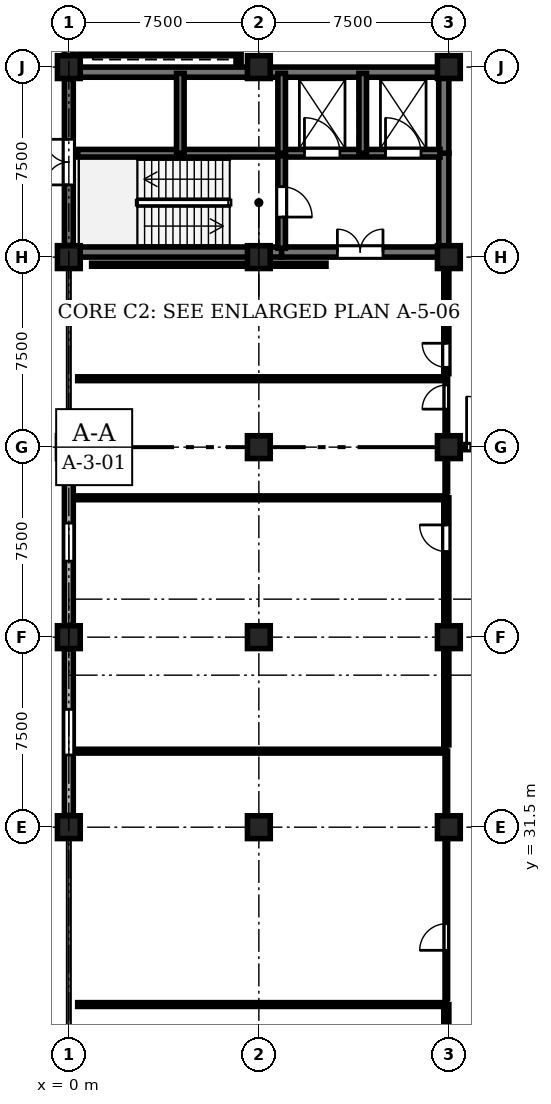
"""IFC4 building model, lengths in metres.
Left out: names, types, materials, properties, quantities, classifications, styles, units other than length and angle.
Written with IfcOpenShell. Run it as: python <this file> out.ifc"""

import sys

from ifc_helpers import new_model, si_unit, direction, frame, frame_2d, origin, origin_2d, place, context, subcontext, project, spatial, rectangle, circle, extrude, element, fill, save


model = new_model("IFC4")
c1 = context("Model", 3, precision=1e-05, world=origin(), true_north=direction((0.0, 1.0)))
c2 = subcontext(c1, "Body", "Model", "MODEL_VIEW")
j1 = project(units=[si_unit("LENGTHUNIT", "METRE"), si_unit("PLANEANGLEUNIT", "RADIAN")], contexts=[c1])
p1 = place(None, origin())
s1 = spatial("IfcSite", under=j1, at=p1, CompositionType="ELEMENT")
p2 = place(p1, origin())
s2 = spatial("IfcBuilding", under=s1, at=p2, CompositionType="ELEMENT")
p3 = place(p2, origin())
s3 = spatial("IfcBuildingStorey", under=s2, at=p3, CompositionType="ELEMENT", Elevation=0.0)
for number, where, z_axis, x_axis in (
    (1, (0.0, 31.5, 0.0), (0.0, 0.0, 1.0), (1.0, 0.0, 0.0)),
    (2, (0.0, 39.0, 0.0), (0.0, 0.0, 1.0), (1.0, 0.0, 0.0)),
):
    element("IfcColumn", number, at=place(p3, frame(where, z_axis=z_axis, x_axis=x_axis)), inside=s3, PredefinedType="COLUMN", context=c2, shape_type="SweptSolid", body=[
        extrude(rectangle(XDim=0.9, YDim=0.9, at=origin_2d()), origin(), (0.0, 0.0, 1.0), 4.8),
    ])
p4 = place(p3, frame((0.0, 46.5, 0.0), z_axis=(0.0, 0.0, 1.0), x_axis=(1.0, 0.0, 0.0)))
e3 = element("IfcColumn", 3, at=p4, inside=s3, PredefinedType="COLUMN", context=c2, shape_type="SweptSolid", body=[
    extrude(circle(Radius=0.45, at=origin_2d()), origin(), (0.0, 0.0, 1.0), 4.8),
])
for number, where, z_axis, x_axis in (
    (4, (0.0, 54.0, 0.0), (0.0, 0.0, 1.0), (1.0, 0.0, 0.0)),
    (5, (0.0, 61.5, 0.0), (0.0, 0.0, 1.0), (1.0, 0.0, 0.0)),
    (6, (7.5, 31.5, 0.0), (0.0, 0.0, 1.0), (1.0, 0.0, 0.0)),
):
    element("IfcColumn", number, at=place(p3, frame(where, z_axis=z_axis, x_axis=x_axis)), inside=s3, PredefinedType="COLUMN", context=c2, shape_type="SweptSolid", body=[
        extrude(rectangle(XDim=0.9, YDim=0.9, at=origin_2d()), origin(), (0.0, 0.0, 1.0), 4.8),
    ])
p5 = place(p3, frame((7.5, 39.0, 0.0), z_axis=(0.0, 0.0, 1.0), x_axis=(1.0, 0.0, 0.0)))
e7 = element("IfcColumn", 7, at=p5, inside=s3, PredefinedType="COLUMN", context=c2, shape_type="SweptSolid", body=[
    extrude(circle(Radius=0.45, at=origin_2d()), origin(), (0.0, 0.0, 1.0), 4.8),
])
for number, where, z_axis, x_axis in (
    (8, (7.5, 46.5, 0.0), (0.0, 0.0, 1.0), (1.0, 0.0, 0.0)),
    (9, (7.5, 54.0, 0.0), (0.0, 0.0, 1.0), (1.0, 0.0, 0.0)),
):
    element("IfcColumn", number, at=place(p3, frame(where, z_axis=z_axis, x_axis=x_axis)), inside=s3, PredefinedType="COLUMN", context=c2, shape_type="SweptSolid", body=[
        extrude(rectangle(XDim=0.9, YDim=0.9, at=origin_2d()), origin(), (0.0, 0.0, 1.0), 4.8),
    ])
for number, where, z_axis, x_axis in (
    (10, (7.5, 61.5, 0.0), (0.0, 0.0, 1.0), (1.0, 0.0, 0.0)),
    (11, (15.0, 31.5, 0.0), (0.0, 0.0, 1.0), (1.0, 0.0, 0.0)),
):
    element("IfcColumn", number, at=place(p3, frame(where, z_axis=z_axis, x_axis=x_axis)), inside=s3, PredefinedType="COLUMN", context=c2, shape_type="SweptSolid", body=[
        extrude(circle(Radius=0.45, at=origin_2d()), origin(), (0.0, 0.0, 1.0), 4.8),
    ])
for number, where, z_axis, x_axis in (
    (12, (15.0, 39.0, 0.0), (0.0, 0.0, 1.0), (1.0, 0.0, 0.0)),
    (13, (15.0, 46.5, 0.0), (0.0, 0.0, 1.0), (1.0, 0.0, 0.0)),
):
    element("IfcColumn", number, at=place(p3, frame(where, z_axis=z_axis, x_axis=x_axis)), inside=s3, PredefinedType="COLUMN", context=c2, shape_type="SweptSolid", body=[
        extrude(rectangle(XDim=0.9, YDim=0.9, at=origin_2d()), origin(), (0.0, 0.0, 1.0), 4.8),
    ])
p6 = place(p3, frame((15.0, 54.0, 0.0), z_axis=(0.0, 0.0, 1.0), x_axis=(1.0, 0.0, 0.0)))
e14 = element("IfcColumn", 14, at=p6, inside=s3, PredefinedType="COLUMN", context=c2, shape_type="SweptSolid", body=[
    extrude(circle(Radius=0.45, at=origin_2d()), origin(), (0.0, 0.0, 1.0), 4.8),
])
p7 = place(p3, frame((15.0, 61.5, 0.0), z_axis=(0.0, 0.0, 1.0), x_axis=(1.0, 0.0, 0.0)))
e15 = element("IfcColumn", 15, at=p7, inside=s3, PredefinedType="COLUMN", context=c2, shape_type="SweptSolid", body=[
    extrude(rectangle(XDim=0.9, YDim=0.9, at=origin_2d()), origin(), (0.0, 0.0, 1.0), 4.8),
])
p8 = place(p3, frame((0.0, 31.96, 0.0), z_axis=(0.0, 0.0, 1.0), x_axis=(0.0, 1.0, 0.0)))
e16 = element("IfcWall", 16, at=p8, inside=s3, PredefinedType="STANDARD", context=c2, shape_type="SweptSolid", body=[
    extrude(rectangle(XDim=6.58, YDim=0.35, at=frame_2d((3.29, 0.0))), origin(), (0.0, 0.0, 1.0), 3.9),
])
p9 = place(p8, frame((2.39, 0.0, 0.9)))
e17 = element("IfcOpeningElement", 17, at=p9, cuts=e16, PredefinedType="OPENING", context=c2, shape_type="SweptSolid", body=[
    extrude(rectangle(XDim=1.8, YDim=2.1, at=frame_2d((0.9, 1.05))), frame((0.0, 0.185, 0.0), z_axis=(0.0, -1.0, 0.0), x_axis=(1.0, 0.0, 0.0)), (0.0, 0.0, 1.0), 0.37),
])
p10 = place(p3, frame((0.0, 39.46, 0.0), z_axis=(0.0, 0.0, 1.0), x_axis=(0.0, 1.0, 0.0)))
e18 = element("IfcWall", 18, at=p10, inside=s3, PredefinedType="STANDARD", context=c2, shape_type="SweptSolid", body=[
    extrude(rectangle(XDim=6.58, YDim=0.35, at=frame_2d((3.29, 0.0))), origin(), (0.0, 0.0, 1.0), 3.9),
])
p11 = place(p10, frame((2.54, 0.0, 0.9)))
e19 = element("IfcOpeningElement", 19, at=p11, cuts=e18, PredefinedType="OPENING", context=c2, shape_type="SweptSolid", body=[
    extrude(rectangle(XDim=1.5, YDim=2.1, at=frame_2d((0.75, 1.05))), frame((0.0, 0.185, 0.0), z_axis=(0.0, -1.0, 0.0), x_axis=(1.0, 0.0, 0.0)), (0.0, 0.0, 1.0), 0.37),
])
p12 = place(p3, frame((0.0, 54.46, 0.0), z_axis=(0.0, 0.0, 1.0), x_axis=(0.0, 1.0, 0.0)))
e20 = element("IfcWall", 20, at=p12, inside=s3, PredefinedType="SHEAR", context=c2, shape_type="SweptSolid", body=[
    extrude(rectangle(XDim=6.58, YDim=0.35, at=frame_2d((3.29, 0.0))), origin(), (0.0, 0.0, 1.0), 4.5),
])
p13 = place(p12, frame((2.39, 0.0, 0.0)))
e21 = element("IfcOpeningElement", 21, at=p13, cuts=e20, PredefinedType="OPENING", context=c2, shape_type="SweptSolid", body=[
    extrude(rectangle(XDim=1.8, YDim=2.5, at=frame_2d((0.9, 1.25))), frame((0.0, 0.185, 0.0), z_axis=(0.0, -1.0, 0.0), x_axis=(1.0, 0.0, 0.0)), (0.0, 0.0, 1.0), 0.37),
])
p14 = place(p3, frame((0.0, 61.96, 0.0), z_axis=(0.0, 0.0, 1.0), x_axis=(0.0, 1.0, 0.0)))
e22 = element("IfcWall", 22, at=p14, inside=s3, PredefinedType="STANDARD", context=c2, shape_type="SweptSolid", body=[
    extrude(rectangle(XDim=6.58, YDim=0.35, at=frame_2d((3.29, 0.0))), origin(), (0.0, 0.0, 1.0), 3.9),
])
p15 = place(p14, frame((2.09, 0.0, 0.9)))
e23 = element("IfcOpeningElement", 23, at=p15, cuts=e22, PredefinedType="OPENING", context=c2, shape_type="SweptSolid", body=[
    extrude(rectangle(XDim=2.4, YDim=2.1, at=frame_2d((1.2, 1.05))), frame((0.0, 0.185, 0.0), z_axis=(0.0, -1.0, 0.0), x_axis=(1.0, 0.0, 0.0)), (0.0, 0.0, 1.0), 0.37),
])
p16 = place(p3, frame((0.35, 54.2, 0.0), z_axis=(0.0, 0.0, 1.0), x_axis=(1.0, 0.0, 0.0)))
e24 = element("IfcWall", 24, at=p16, inside=s3, PredefinedType="SHEAR", context=c2, shape_type="SweptSolid", body=[
    extrude(rectangle(XDim=8.05, YDim=0.4, at=frame_2d((4.025, 0.0))), origin(), (0.0, 0.0, 1.0), 4.5),
])
p17 = place(p3, frame((8.4, 54.2, 0.0), z_axis=(0.0, 0.0, 1.0), x_axis=(1.0, 0.0, 0.0)))
e25 = element("IfcWall", 25, at=p17, inside=s3, PredefinedType="SHEAR", context=c2, shape_type="SweptSolid", body=[
    extrude(rectangle(XDim=6.25, YDim=0.4, at=frame_2d((3.125, 0.0))), origin(), (0.0, 0.0, 1.0), 4.5),
])
p18 = place(p17, frame((2.2, 0.0, 0.0)))
e26 = element("IfcOpeningElement", 26, at=p18, cuts=e25, PredefinedType="OPENING", context=c2, shape_type="SweptSolid", body=[
    extrude(rectangle(XDim=1.8, YDim=2.25, at=frame_2d((0.9, 1.125))), frame((0.0, 0.21, 0.0), z_axis=(0.0, -1.0, 0.0), x_axis=(1.0, 0.0, 0.0)), (0.0, 0.0, 1.0), 0.42),
])
p19 = place(p3, frame((0.35, 61.3, 0.0), z_axis=(0.0, 0.0, 1.0), x_axis=(1.0, 0.0, 0.0)))
e27 = element("IfcWall", 27, at=p19, inside=s3, PredefinedType="SHEAR", context=c2, shape_type="SweptSolid", body=[
    extrude(rectangle(XDim=14.3, YDim=0.4, at=frame_2d((7.15, 0.0))), origin(), (0.0, 0.0, 1.0), 4.5),
])
p20 = place(p3, frame((14.8, 54.35, 0.0), z_axis=(0.0, 0.0, 1.0), x_axis=(0.0, 1.0, 0.0)))
e28 = element("IfcWall", 28, at=p20, inside=s3, PredefinedType="SHEAR", context=c2, shape_type="SweptSolid", body=[
    extrude(rectangle(XDim=3.75, YDim=0.4, at=frame_2d((1.875, 0.0))), origin(), (0.0, 0.0, 1.0), 4.5),
])
p21 = place(p3, frame((14.8, 58.1, 0.0), z_axis=(0.0, 0.0, 1.0), x_axis=(0.0, 1.0, 0.0)))
e29 = element("IfcWall", 29, at=p21, inside=s3, PredefinedType="SHEAR", context=c2, shape_type="SweptSolid", body=[
    extrude(rectangle(XDim=3.05, YDim=0.4, at=frame_2d((1.525, 0.0))), origin(), (0.0, 0.0, 1.0), 4.5),
])
p22 = place(p3, frame((0.35, 58.1, 0.0), z_axis=(0.0, 0.0, 1.0), x_axis=(1.0, 0.0, 0.0)))
e30 = element("IfcWall", 30, at=p22, inside=s3, PredefinedType="SHEAR", context=c2, shape_type="SweptSolid", body=[
    extrude(rectangle(XDim=8.05, YDim=0.3, at=frame_2d((4.025, 0.0))), origin(), (0.0, 0.0, 1.0), 4.5),
])
p23 = place(p3, frame((8.4, 58.1, 0.0), z_axis=(0.0, 0.0, 1.0), x_axis=(1.0, 0.0, 0.0)))
e31 = element("IfcWall", 31, at=p23, inside=s3, PredefinedType="SHEAR", context=c2, shape_type="SweptSolid", body=[
    extrude(rectangle(XDim=6.25, YDim=0.3, at=frame_2d((3.125, 0.0))), origin(), (0.0, 0.0, 1.0), 4.5),
])
p24 = place(p23, frame((0.9, 0.0, 0.0)))
e32 = element("IfcOpeningElement", 32, at=p24, cuts=e31, PredefinedType="OPENING", context=c2, shape_type="SweptSolid", body=[
    extrude(rectangle(XDim=1.4, YDim=2.25, at=frame_2d((0.7, 1.125))), frame((0.0, 0.16, 0.0), z_axis=(0.0, -1.0, 0.0), x_axis=(1.0, 0.0, 0.0)), (0.0, 0.0, 1.0), 0.32),
])
p25 = place(p23, frame((4.1, 0.0, 0.0)))
e33 = element("IfcOpeningElement", 33, at=p25, cuts=e31, PredefinedType="OPENING", context=c2, shape_type="SweptSolid", body=[
    extrude(rectangle(XDim=1.4, YDim=2.25, at=frame_2d((0.7, 1.125))), frame((0.0, 0.16, 0.0), z_axis=(0.0, -1.0, 0.0), x_axis=(1.0, 0.0, 0.0)), (0.0, 0.0, 1.0), 0.32),
])
p26 = place(p3, frame((8.4, 58.0, 0.0), z_axis=(0.0, 0.0, 1.0), x_axis=(0.0, -1.0, 0.0)))
e34 = element("IfcWall", 34, at=p26, inside=s3, PredefinedType="SHEAR", context=c2, shape_type="SweptSolid", body=[
    extrude(rectangle(XDim=3.65, YDim=0.3, at=frame_2d((1.825, 0.0))), origin(), (0.0, 0.0, 1.0), 4.5),
])
p27 = place(p26, frame((1.22, 0.0, 0.0)))
e35 = element("IfcOpeningElement", 35, at=p27, cuts=e34, PredefinedType="OPENING", context=c2, shape_type="SweptSolid", body=[
    extrude(rectangle(XDim=1.2, YDim=2.25, at=frame_2d((0.6, 1.125))), frame((0.0, 0.16, 0.0), z_axis=(0.0, -1.0, 0.0), x_axis=(1.0, 0.0, 0.0)), (0.0, 0.0, 1.0), 0.32),
])
for number, where, z_axis, x_axis in (
    (36, (4.4, 58.1, 0.0), (0.0, 0.0, 1.0), (0.0, 1.0, 0.0)),
    (37, (8.4, 58.1, 0.0), (0.0, 0.0, 1.0), (0.0, 1.0, 0.0)),
    (38, (11.6, 58.1, 0.0), (0.0, 0.0, 1.0), (0.0, 1.0, 0.0)),
):
    element("IfcWall", number, at=place(p3, frame(where, z_axis=z_axis, x_axis=x_axis)), inside=s3, PredefinedType="SHEAR", context=c2, shape_type="SweptSolid", body=[
        extrude(rectangle(XDim=3.15, YDim=0.3, at=frame_2d((1.575, 0.0))), origin(), (0.0, 0.0, 1.0), 4.5),
    ])
p28 = place(p3, frame((6.7, 61.65, 0.0), z_axis=(0.0, 0.0, 1.0), x_axis=(0.0, 1.0, 0.0)))
e39 = element("IfcWall", 39, at=p28, inside=s3, PredefinedType="STANDARD", context=c2, shape_type="SweptSolid", body=[
    extrude(rectangle(XDim=31.0, YDim=0.2, at=frame_2d((15.5, 0.0))), origin(), (0.0, 0.0, 1.0), 4.44),
])
p29 = place(p3, frame((0.4, 62.05, 0.0), z_axis=(0.0, 0.0, 1.0), x_axis=(1.0, 0.0, 0.0)))
e40 = element("IfcWall", 40, at=p29, inside=s3, PredefinedType="STANDARD", context=c2, shape_type="SweptSolid", body=[
    extrude(rectangle(XDim=6.3, YDim=0.2, at=frame_2d((3.15, 0.0))), origin(), (0.0, 0.0, 1.0), 4.44),
])
p30 = place(p3, frame((14.9, 15.3, 0.0), z_axis=(0.0, 0.0, 1.0), x_axis=(0.0, 1.0, 0.0)))
e41 = element("IfcWall", 41, at=p30, inside=s3, PredefinedType="STANDARD", context=c2, shape_type="SweptSolid", body=[
    extrude(rectangle(XDim=9.2, YDim=0.2, at=frame_2d((4.6, 0.0))), origin(), (0.0, 0.0, 1.0), 3.785),
])
p31 = place(p30, frame((2.545, 0.0, 0.0)))
e42 = element("IfcOpeningElement", 42, at=p31, cuts=e41, PredefinedType="OPENING", context=c2, shape_type="SweptSolid", body=[
    extrude(rectangle(XDim=1.05, YDim=2.2, at=frame_2d((0.525, 1.1))), frame((0.0, 0.11, 0.0), z_axis=(0.0, -1.0, 0.0), x_axis=(1.0, 0.0, 0.0)), (0.0, 0.0, 1.0), 0.22),
])
p32 = place(p3, frame((14.9, 24.75, 0.0), z_axis=(0.0, 0.0, 1.0), x_axis=(0.0, 1.0, 0.0)))
e43 = element("IfcWall", 43, at=p32, inside=s3, PredefinedType="PARTITIONING", context=c2, shape_type="SweptSolid", body=[
    extrude(rectangle(XDim=9.75, YDim=0.1, at=frame_2d((4.875, 0.0))), origin(), (0.0, 0.0, 1.0), 3.785),
])
p33 = place(p32, frame((1.89, 0.0, 0.0)))
e44 = element("IfcOpeningElement", 44, at=p33, cuts=e43, PredefinedType="OPENING", context=c2, shape_type="SweptSolid", body=[
    extrude(rectangle(XDim=1.05, YDim=2.2, at=frame_2d((0.525, 1.1))), frame((0.0, 0.06, 0.0), z_axis=(0.0, -1.0, 0.0), x_axis=(1.0, 0.0, 0.0)), (0.0, 0.0, 1.0), 0.12),
])
p34 = place(p3, frame((14.9, 34.75, 0.0), z_axis=(0.0, 0.0, 1.0), x_axis=(0.0, 1.0, 0.0)))
e45 = element("IfcWall", 45, at=p34, inside=s3, PredefinedType="STANDARD", context=c2, shape_type="SweptSolid", body=[
    extrude(rectangle(XDim=9.75, YDim=0.2, at=frame_2d((4.875, 0.0))), origin(), (0.0, 0.0, 1.0), 3.935),
])
p35 = place(p34, frame((7.63, 0.0, 0.0)))
e46 = element("IfcOpeningElement", 46, at=p35, cuts=e45, PredefinedType="OPENING", context=c2, shape_type="SweptSolid", body=[
    extrude(rectangle(XDim=1.05, YDim=2.2, at=frame_2d((0.525, 1.1))), frame((0.0, 0.11, 0.0), z_axis=(0.0, -1.0, 0.0), x_axis=(1.0, 0.0, 0.0)), (0.0, 0.0, 1.0), 0.22),
])
p36 = place(p3, frame((14.9, 44.75, 0.0), z_axis=(0.0, 0.0, 1.0), x_axis=(0.0, 1.0, 0.0)))
e47 = element("IfcWall", 47, at=p36, inside=s3, PredefinedType="PARTITIONING", context=c2, shape_type="SweptSolid", body=[
    extrude(rectangle(XDim=4.45, YDim=0.1, at=frame_2d((2.225, 0.0))), origin(), (0.0, 0.0, 1.0), 3.935),
])
p37 = place(p36, frame((3.25, 0.0, 0.0)))
e48 = element("IfcOpeningElement", 48, at=p37, cuts=e47, PredefinedType="OPENING", context=c2, shape_type="SweptSolid", body=[
    extrude(rectangle(XDim=0.95, YDim=2.15, at=frame_2d((0.475, 1.075))), frame((0.0, 0.06, 0.0), z_axis=(0.0, -1.0, 0.0), x_axis=(1.0, 0.0, 0.0)), (0.0, 0.0, 1.0), 0.12),
])
p38 = place(p3, frame((14.9, 49.4, 0.0), z_axis=(0.0, 0.0, 1.0), x_axis=(0.0, 1.0, 0.0)))
e49 = element("IfcWall", 49, at=p38, inside=s3, PredefinedType="STANDARD", context=c2, shape_type="SweptSolid", body=[
    extrude(rectangle(XDim=4.3, YDim=0.2, at=frame_2d((2.15, 0.0))), origin(), (0.0, 0.0, 1.0), 3.935),
])
p39 = place(p38, frame((0.25, 0.0, 0.0)))
e50 = element("IfcOpeningElement", 50, at=p39, cuts=e49, PredefinedType="OPENING", context=c2, shape_type="SweptSolid", body=[
    extrude(rectangle(XDim=0.95, YDim=2.15, at=frame_2d((0.475, 1.075))), frame((0.0, 0.11, 0.0), z_axis=(0.0, -1.0, 0.0), x_axis=(1.0, 0.0, 0.0)), (0.0, 0.0, 1.0), 0.22),
])
for number, where, z_axis, x_axis in (
    (51, (0.35, 24.5, 0.0), (0.0, 0.0, 1.0), (1.0, 0.0, 0.0)),
    (52, (0.35, 34.5, 0.0), (0.0, 0.0, 1.0), (1.0, 0.0, 0.0)),
    (53, (0.35, 44.5, 0.0), (0.0, 0.0, 1.0), (1.0, 0.0, 0.0)),
    (54, (0.35, 49.2, 0.0), (0.0, 0.0, 1.0), (1.0, 0.0, 0.0)),
):
    element("IfcWall", number, at=place(p3, frame(where, z_axis=z_axis, x_axis=x_axis)), inside=s3, PredefinedType="PARTITIONING", context=c2, shape_type="SweptSolid", body=[
        extrude(rectangle(XDim=14.55, YDim=0.15, at=frame_2d((7.275, 0.0))), origin(), (0.0, 0.0, 1.0), 4.485),
    ])
p40 = place(p3, frame((0.9, 53.7, 0.0), z_axis=(0.0, 0.0, 1.0), x_axis=(1.0, 0.0, 0.0)))
e55 = element("IfcWall", 55, at=p40, inside=s3, PredefinedType="PARTITIONING", context=c2, shape_type="SweptSolid", body=[
    extrude(rectangle(XDim=9.25, YDim=0.12, at=frame_2d((4.625, 0.0))), origin(), (0.0, 0.0, 1.0), 3.835),
])
p41 = place(p3, frame((15.2, 46.5, 0.0), z_axis=(0.0, 0.0, 1.0), x_axis=(1.0, 0.0, 0.0)))
e56 = element("IfcWall", 56, at=p41, inside=s3, PredefinedType="STANDARD", context=c2, shape_type="SweptSolid", body=[
    extrude(rectangle(XDim=3.0, YDim=0.2, at=frame_2d((1.5, 0.0))), origin(), (0.0, 0.0, 1.0), 3.835),
])
p42 = place(p41, frame((0.5, 0.0, 0.0)))
e57 = element("IfcOpeningElement", 57, at=p42, cuts=e56, PredefinedType="OPENING", context=c2, shape_type="SweptSolid", body=[
    extrude(rectangle(XDim=2.0, YDim=2.3, at=frame_2d((1.0, 1.15))), frame((0.0, 0.11, 0.0), z_axis=(0.0, -1.0, 0.0), x_axis=(1.0, 0.0, 0.0)), (0.0, 0.0, 1.0), 0.22),
])
p43 = place(p9, origin())
e58 = element("IfcWindow", 58, at=p43, inside=s3, PartitioningType="SINGLE_PANEL", PredefinedType="WINDOW", context=c2, shape_type="SweptSolid", body=[
    extrude(rectangle(XDim=1.8, YDim=2.1, at=frame_2d((0.9, 1.05))), frame((0.0, 0.03, 0.0), z_axis=(0.0, -1.0, 0.0), x_axis=(1.0, 0.0, 0.0)), (0.0, 0.0, 1.0), 0.06),
])
fill(e17, e58)
p44 = place(p11, origin())
e59 = element("IfcWindow", 59, at=p44, inside=s3, PartitioningType="SINGLE_PANEL", PredefinedType="WINDOW", context=c2, shape_type="SweptSolid", body=[
    extrude(rectangle(XDim=1.5, YDim=2.1, at=frame_2d((0.75, 1.05))), frame((0.0, 0.03, 0.0), z_axis=(0.0, -1.0, 0.0), x_axis=(1.0, 0.0, 0.0)), (0.0, 0.0, 1.0), 0.06),
])
fill(e19, e59)
p45 = place(p13, origin())
e60 = element("IfcDoor", 60, at=p45, inside=s3, OperationType="DOUBLE_DOOR_SINGLE_SWING", PredefinedType="DOOR", context=c2, shape_type="SweptSolid", body=[
    extrude(rectangle(XDim=1.8, YDim=2.5, at=frame_2d((0.9, 1.25))), frame((0.0, 0.025, 0.0), z_axis=(0.0, -1.0, 0.0), x_axis=(1.0, 0.0, 0.0)), (0.0, 0.0, 1.0), 0.05),
])
fill(e21, e60)
p46 = place(p18, origin())
e61 = element("IfcDoor", 61, at=p46, inside=s3, OperationType="DOUBLE_DOOR_SINGLE_SWING", PredefinedType="DOOR", context=c2, shape_type="SweptSolid", body=[
    extrude(rectangle(XDim=1.8, YDim=2.25, at=frame_2d((0.9, 1.125))), frame((0.0, 0.025, 0.0), z_axis=(0.0, -1.0, 0.0), x_axis=(1.0, 0.0, 0.0)), (0.0, 0.0, 1.0), 0.05),
])
fill(e26, e61)
p47 = place(p24, origin())
e62 = element("IfcDoor", 62, at=p47, inside=s3, OperationType="DOUBLE_DOOR_SLIDING", PredefinedType="DOOR", context=c2, shape_type="SweptSolid", body=[
    extrude(rectangle(XDim=1.4, YDim=2.25, at=frame_2d((0.7, 1.125))), frame((0.0, 0.025, 0.0), z_axis=(0.0, -1.0, 0.0), x_axis=(1.0, 0.0, 0.0)), (0.0, 0.0, 1.0), 0.05),
])
fill(e32, e62)
p48 = place(p25, origin())
e63 = element("IfcDoor", 63, at=p48, inside=s3, OperationType="DOUBLE_DOOR_SLIDING", PredefinedType="DOOR", context=c2, shape_type="SweptSolid", body=[
    extrude(rectangle(XDim=1.4, YDim=2.25, at=frame_2d((0.7, 1.125))), frame((0.0, 0.025, 0.0), z_axis=(0.0, -1.0, 0.0), x_axis=(1.0, 0.0, 0.0)), (0.0, 0.0, 1.0), 0.05),
])
fill(e33, e63)
p49 = place(p27, origin())
e64 = element("IfcDoor", 64, at=p49, inside=s3, OperationType="SINGLE_SWING_RIGHT", PredefinedType="DOOR", context=c2, shape_type="SweptSolid", body=[
    extrude(rectangle(XDim=1.2, YDim=2.25, at=frame_2d((0.6, 1.125))), frame((0.0, 0.025, 0.0), z_axis=(0.0, -1.0, 0.0), x_axis=(1.0, 0.0, 0.0)), (0.0, 0.0, 1.0), 0.05),
])
fill(e35, e64)
p50 = place(p33, origin())
e65 = element("IfcDoor", 65, at=p50, inside=s3, OperationType="SINGLE_SWING_LEFT", PredefinedType="DOOR", context=c2, shape_type="SweptSolid", body=[
    extrude(rectangle(XDim=1.05, YDim=2.2, at=frame_2d((0.525, 1.1))), frame((0.0, 0.025, 0.0), z_axis=(0.0, -1.0, 0.0), x_axis=(1.0, 0.0, 0.0)), (0.0, 0.0, 1.0), 0.05),
])
fill(e44, e65)
p51 = place(p35, origin())
e66 = element("IfcDoor", 66, at=p51, inside=s3, OperationType="SINGLE_SWING_RIGHT", PredefinedType="DOOR", context=c2, shape_type="SweptSolid", body=[
    extrude(rectangle(XDim=1.05, YDim=2.2, at=frame_2d((0.525, 1.1))), frame((0.0, 0.025, 0.0), z_axis=(0.0, -1.0, 0.0), x_axis=(1.0, 0.0, 0.0)), (0.0, 0.0, 1.0), 0.05),
])
fill(e46, e66)
p52 = place(p37, origin())
e67 = element("IfcDoor", 67, at=p52, inside=s3, OperationType="SINGLE_SWING_LEFT", PredefinedType="DOOR", context=c2, shape_type="SweptSolid", body=[
    extrude(rectangle(XDim=0.95, YDim=2.15, at=frame_2d((0.475, 1.075))), frame((0.0, 0.025, 0.0), z_axis=(0.0, -1.0, 0.0), x_axis=(1.0, 0.0, 0.0)), (0.0, 0.0, 1.0), 0.05),
])
fill(e48, e67)
p53 = place(p39, origin())
e68 = element("IfcDoor", 68, at=p53, inside=s3, OperationType="SINGLE_SWING_RIGHT", PredefinedType="DOOR", context=c2, shape_type="SweptSolid", body=[
    extrude(rectangle(XDim=0.95, YDim=2.15, at=frame_2d((0.475, 1.075))), frame((0.0, 0.025, 0.0), z_axis=(0.0, -1.0, 0.0), x_axis=(1.0, 0.0, 0.0)), (0.0, 0.0, 1.0), 0.05),
])
fill(e50, e68)
p54 = place(p42, origin())
e69 = element("IfcDoor", 69, at=p54, inside=s3, OperationType="DOUBLE_DOOR_SINGLE_SWING", PredefinedType="DOOR", context=c2, shape_type="SweptSolid", body=[
    extrude(rectangle(XDim=2.0, YDim=2.3, at=frame_2d((1.0, 1.15))), frame((0.0, 0.025, 0.0), z_axis=(0.0, -1.0, 0.0), x_axis=(1.0, 0.0, 0.0)), (0.0, 0.0, 1.0), 0.05),
])
fill(e57, e69)
save(model, sys.argv[1])
